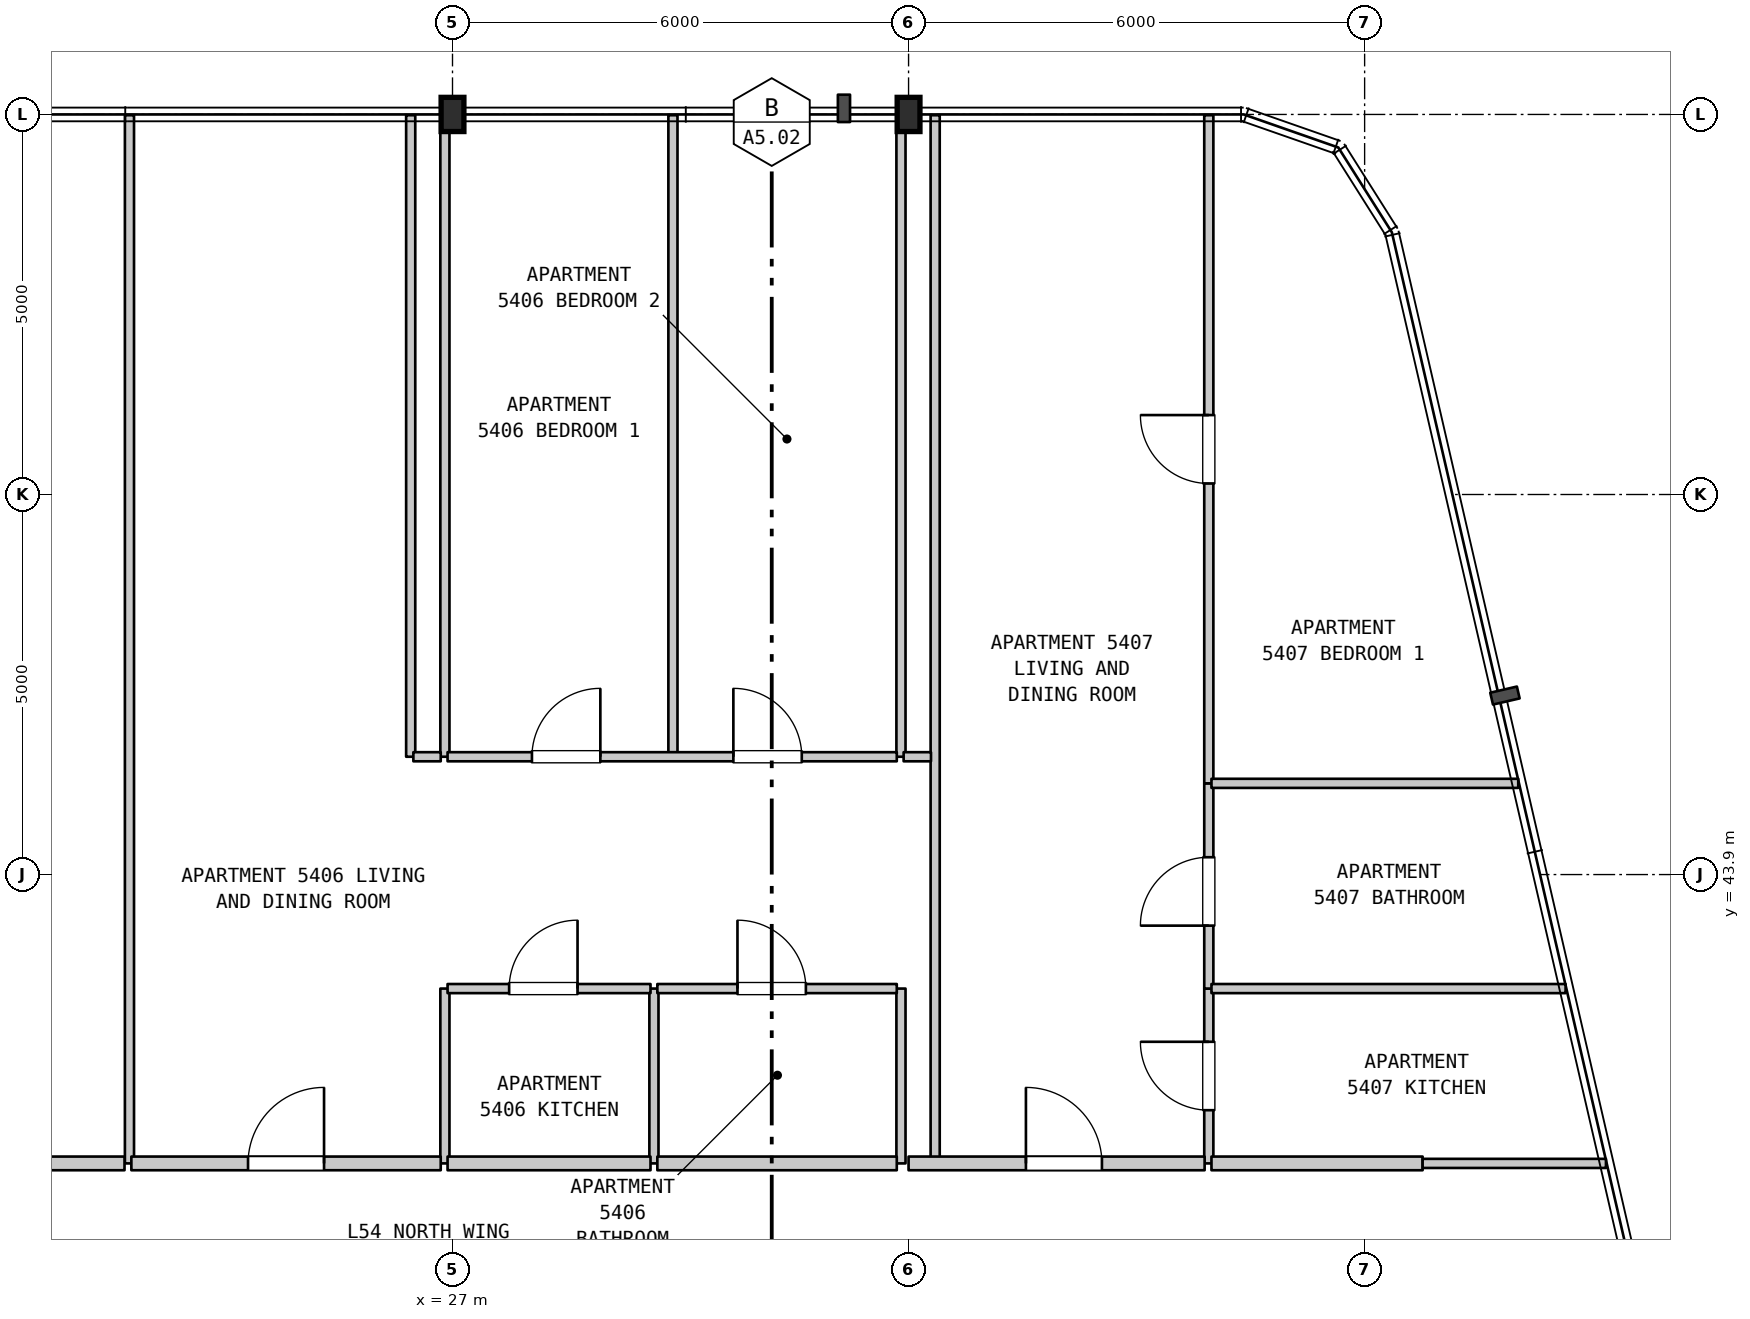
"""IFC4 building model, lengths in metres.
Left out: names, types, materials, properties, quantities, classifications, styles, units other than length and angle.
Written with IfcOpenShell. Run it as: python <this file> out.ifc"""

import sys

from ifc_helpers import new_model, si_unit, direction, frame, frame_2d, origin, origin_2d, place, context, subcontext, project, spatial, rectangle, i_section, extrude, element, fill, save


model = new_model("IFC4")
c1 = context("Model", 3, precision=1e-05, world=origin(), true_north=direction((0.0, 1.0)))
c2 = subcontext(c1, "Body", "Model", "MODEL_VIEW")
j1 = project(units=[si_unit("LENGTHUNIT", "METRE"), si_unit("PLANEANGLEUNIT", "RADIAN")], contexts=[c1])
p1 = place(None, origin())
s1 = spatial("IfcSite", under=j1, at=p1, CompositionType="ELEMENT")
p2 = place(p1, origin())
s2 = spatial("IfcBuilding", under=s1, at=p2, CompositionType="ELEMENT")
p3 = place(p2, frame((0.0, 0.0, 218.0)))
s3 = spatial("IfcBuildingStorey", under=s2, at=p3, CompositionType="ELEMENT", Elevation=218.0)
for number, where, z_axis, x_axis in (
    (1, (27.0, 53.9, 0.0), (0.0, 0.0, 1.0), (1.0, 0.0, 0.0)),
    (2, (33.0, 53.9, 0.0), (0.0, 0.0, 1.0), (1.0, 0.0, 0.0)),
):
    element("IfcColumn", number, at=place(p3, frame(where, z_axis=z_axis, x_axis=x_axis)), inside=s3, PredefinedType="COLUMN", context=c2, shape_type="SweptSolid", body=[
        extrude(i_section(OverallWidth=0.3, OverallDepth=0.45, WebThickness=0.014, FlangeThickness=0.026, FilletRadius=0.027, at=origin_2d()), origin(), (0.0, 0.0, 1.0), 4.8),
    ])
p4 = place(p3, frame((22.75, 40.1, 0.0), z_axis=(0.0, 0.0, 1.0), x_axis=(0.0, 1.0, 0.0)))
e3 = element("IfcWall", 3, at=p4, inside=s3, PredefinedType="PARTITIONING", context=c2, shape_type="SweptSolid", body=[
    extrude(rectangle(XDim=13.79, YDim=0.12, at=frame_2d((6.895, 0.0))), origin(), (0.0, 0.0, 1.0), 4.49),
])
p5 = place(p3, frame((26.45, 45.45, 0.0), z_axis=(0.0, 0.0, 1.0), x_axis=(0.0, 1.0, 0.0)))
e4 = element("IfcWall", 4, at=p5, inside=s3, PredefinedType="PARTITIONING", context=c2, shape_type="SweptSolid", body=[
    extrude(rectangle(XDim=8.44, YDim=0.12, at=frame_2d((4.22, 0.0))), origin(), (0.0, 0.0, 1.0), 4.49),
])
p6 = place(p3, frame((26.9, 40.1, 0.0), z_axis=(0.0, 0.0, 1.0), x_axis=(0.0, 1.0, 0.0)))
e5 = element("IfcWall", 5, at=p6, inside=s3, PredefinedType="PARTITIONING", context=c2, shape_type="SweptSolid", body=[
    extrude(rectangle(XDim=2.3, YDim=0.12, at=frame_2d((1.15, 0.0))), origin(), (0.0, 0.0, 1.0), 4.49),
])
p7 = place(p3, frame((26.9, 45.45, 0.0), z_axis=(0.0, 0.0, 1.0), x_axis=(0.0, 1.0, 0.0)))
e6 = element("IfcWall", 6, at=p7, inside=s3, PredefinedType="PARTITIONING", context=c2, shape_type="SweptSolid", body=[
    extrude(rectangle(XDim=8.44, YDim=0.12, at=frame_2d((4.22, 0.0))), origin(), (0.0, 0.0, 1.0), 4.49),
])
p8 = place(p3, frame((29.65, 40.1, 0.0), z_axis=(0.0, 0.0, 1.0), x_axis=(0.0, 1.0, 0.0)))
e7 = element("IfcWall", 7, at=p8, inside=s3, PredefinedType="PARTITIONING", context=c2, shape_type="SweptSolid", body=[
    extrude(rectangle(XDim=2.3, YDim=0.12, at=frame_2d((1.15, 0.0))), origin(), (0.0, 0.0, 1.0), 4.49),
])
p9 = place(p3, frame((29.9, 45.45, 0.0), z_axis=(0.0, 0.0, 1.0), x_axis=(0.0, 1.0, 0.0)))
e8 = element("IfcWall", 8, at=p9, inside=s3, PredefinedType="PARTITIONING", context=c2, shape_type="SweptSolid", body=[
    extrude(rectangle(XDim=8.44, YDim=0.12, at=frame_2d((4.22, 0.0))), origin(), (0.0, 0.0, 1.0), 4.49),
])
p10 = place(p3, frame((32.9, 40.1, 0.0), z_axis=(0.0, 0.0, 1.0), x_axis=(0.0, 1.0, 0.0)))
e9 = element("IfcWall", 9, at=p10, inside=s3, PredefinedType="PARTITIONING", context=c2, shape_type="SweptSolid", body=[
    extrude(rectangle(XDim=2.3, YDim=0.12, at=frame_2d((1.15, 0.0))), origin(), (0.0, 0.0, 1.0), 3.89),
])
p11 = place(p3, frame((32.9, 45.45, 0.0), z_axis=(0.0, 0.0, 1.0), x_axis=(0.0, 1.0, 0.0)))
e10 = element("IfcWall", 10, at=p11, inside=s3, PredefinedType="PARTITIONING", context=c2, shape_type="SweptSolid", body=[
    extrude(rectangle(XDim=8.44, YDim=0.12, at=frame_2d((4.22, 0.0))), origin(), (0.0, 0.0, 1.0), 3.89),
])
p12 = place(p3, frame((33.35, 40.1, 0.0), z_axis=(0.0, 0.0, 1.0), x_axis=(0.0, 1.0, 0.0)))
e11 = element("IfcWall", 11, at=p12, inside=s3, PredefinedType="PARTITIONING", context=c2, shape_type="SweptSolid", body=[
    extrude(rectangle(XDim=13.79, YDim=0.12, at=frame_2d((6.895, 0.0))), origin(), (0.0, 0.0, 1.0), 4.49),
])
p13 = place(p3, frame((36.95, 40.1, 0.0), z_axis=(0.0, 0.0, 1.0), x_axis=(0.0, 1.0, 0.0)))
e12 = element("IfcWall", 12, at=p13, inside=s3, PredefinedType="PARTITIONING", context=c2, shape_type="SweptSolid", body=[
    extrude(rectangle(XDim=2.3, YDim=0.12, at=frame_2d((1.15, 0.0))), origin(), (0.0, 0.0, 1.0), 4.49),
])
p14 = place(p13, frame((0.7, 0.0, 0.0)))
e13 = element("IfcOpeningElement", 13, at=p14, cuts=e12, PredefinedType="OPENING", context=c2, shape_type="SweptSolid", body=[
    extrude(rectangle(XDim=0.9, YDim=2.15, at=frame_2d((0.45, 1.075))), frame((0.0, 0.07, 0.0), z_axis=(0.0, -1.0, 0.0), x_axis=(1.0, 0.0, 0.0)), (0.0, 0.0, 1.0), 0.14),
])
p15 = place(p3, frame((36.95, 42.4, 0.0), z_axis=(0.0, 0.0, 1.0), x_axis=(0.0, 1.0, 0.0)))
e14 = element("IfcWall", 14, at=p15, inside=s3, PredefinedType="PARTITIONING", context=c2, shape_type="SweptSolid", body=[
    extrude(rectangle(XDim=2.7, YDim=0.12, at=frame_2d((1.35, 0.0))), origin(), (0.0, 0.0, 1.0), 4.49),
])
p16 = place(p15, frame((0.828, 0.0, 0.0)))
e15 = element("IfcOpeningElement", 15, at=p16, cuts=e14, PredefinedType="OPENING", context=c2, shape_type="SweptSolid", body=[
    extrude(rectangle(XDim=0.9, YDim=2.1, at=frame_2d((0.45, 1.05))), frame((0.0, 0.07, 0.0), z_axis=(0.0, -1.0, 0.0), x_axis=(1.0, 0.0, 0.0)), (0.0, 0.0, 1.0), 0.14),
])
p17 = place(p3, frame((36.95, 45.1, 0.0), z_axis=(0.0, 0.0, 1.0), x_axis=(0.0, 1.0, 0.0)))
e16 = element("IfcWall", 16, at=p17, inside=s3, PredefinedType="PARTITIONING", context=c2, shape_type="SweptSolid", body=[
    extrude(rectangle(XDim=8.79, YDim=0.12, at=frame_2d((4.395, 0.0))), origin(), (0.0, 0.0, 1.0), 4.49),
])
p18 = place(p17, frame((3.945, 0.0, 0.0)))
e17 = element("IfcOpeningElement", 17, at=p18, cuts=e16, PredefinedType="OPENING", context=c2, shape_type="SweptSolid", body=[
    extrude(rectangle(XDim=0.9, YDim=2.15, at=frame_2d((0.45, 1.075))), frame((0.0, 0.07, 0.0), z_axis=(0.0, -1.0, 0.0), x_axis=(1.0, 0.0, 0.0)), (0.0, 0.0, 1.0), 0.14),
])
p19 = place(p3, frame((20.275, 40.1, 0.0), z_axis=(0.0, 0.0, 1.0), x_axis=(1.0, 0.0, 0.0)))
e18 = element("IfcWall", 18, at=p19, inside=s3, PredefinedType="STANDARD", context=c2, shape_type="SweptSolid", body=[
    extrude(rectangle(XDim=2.41, YDim=0.18, at=frame_2d((1.205, 0.0))), origin(), (0.0, 0.0, 1.0), 4.49),
])
p20 = place(p3, frame((22.775, 40.1, 0.0), z_axis=(0.0, 0.0, 1.0), x_axis=(1.0, 0.0, 0.0)))
e19 = element("IfcWall", 19, at=p20, inside=s3, PredefinedType="STANDARD", context=c2, shape_type="SweptSolid", body=[
    extrude(rectangle(XDim=4.07, YDim=0.18, at=frame_2d((2.035, 0.0))), origin(), (0.0, 0.0, 1.0), 4.49),
])
p21 = place(p20, frame((1.535, 0.0, 0.0)))
e20 = element("IfcOpeningElement", 20, at=p21, cuts=e19, PredefinedType="OPENING", context=c2, shape_type="SweptSolid", body=[
    extrude(rectangle(XDim=1.0, YDim=2.15, at=frame_2d((0.5, 1.075))), frame((0.0, 0.1, 0.0), z_axis=(0.0, -1.0, 0.0), x_axis=(1.0, 0.0, 0.0)), (0.0, 0.0, 1.0), 0.2),
])
p22 = place(p3, frame((26.935, 40.1, 0.0), z_axis=(0.0, 0.0, 1.0), x_axis=(1.0, 0.0, 0.0)))
e21 = element("IfcWall", 21, at=p22, inside=s3, PredefinedType="STANDARD", context=c2, shape_type="SweptSolid", body=[
    extrude(rectangle(XDim=2.67, YDim=0.18, at=frame_2d((1.335, 0.0))), origin(), (0.0, 0.0, 1.0), 4.49),
])
p23 = place(p3, frame((29.695, 40.1, 0.0), z_axis=(0.0, 0.0, 1.0), x_axis=(1.0, 0.0, 0.0)))
e22 = element("IfcWall", 22, at=p23, inside=s3, PredefinedType="STANDARD", context=c2, shape_type="SweptSolid", body=[
    extrude(rectangle(XDim=3.15, YDim=0.18, at=frame_2d((1.575, 0.0))), origin(), (0.0, 0.0, 1.0), 4.49),
])
p24 = place(p3, frame((33.0, 40.1, 0.0), z_axis=(0.0, 0.0, 1.0), x_axis=(1.0, 0.0, 0.0)))
e23 = element("IfcWall", 23, at=p24, inside=s3, PredefinedType="STANDARD", context=c2, shape_type="SweptSolid", body=[
    extrude(rectangle(XDim=3.895, YDim=0.18, at=frame_2d((1.948, 0.0))), origin(), (0.0, 0.0, 1.0), 4.49),
])
p25 = place(p24, frame((1.544, 0.0, 0.0)))
e24 = element("IfcOpeningElement", 24, at=p25, cuts=e23, PredefinedType="OPENING", context=c2, shape_type="SweptSolid", body=[
    extrude(rectangle(XDim=1.0, YDim=2.15, at=frame_2d((0.5, 1.075))), frame((0.0, 0.1, 0.0), z_axis=(0.0, -1.0, 0.0), x_axis=(1.0, 0.0, 0.0)), (0.0, 0.0, 1.0), 0.2),
])
p26 = place(p3, frame((36.985, 40.1, 0.0), z_axis=(0.0, 0.0, 1.0), x_axis=(1.0, 0.0, 0.0)))
e25 = element("IfcWall", 25, at=p26, inside=s3, PredefinedType="STANDARD", context=c2, shape_type="SweptSolid", body=[
    extrude(rectangle(XDim=2.778, YDim=0.18, at=frame_2d((1.389, 0.0))), origin(), (0.0, 0.0, 1.0), 4.49),
])
p27 = place(p3, frame((39.763, 40.1, 0.0), z_axis=(0.0, 0.0, 1.0), x_axis=(1.0, 0.0, 0.0)))
e26 = element("IfcWall", 26, at=p27, inside=s3, PredefinedType="PARTITIONING", context=c2, shape_type="SweptSolid", body=[
    extrude(rectangle(XDim=2.412, YDim=0.12, at=frame_2d((1.206, 0.0))), origin(), (0.0, 0.0, 1.0), 4.49),
])
p28 = place(p3, frame((26.935, 42.4, 0.0), z_axis=(0.0, 0.0, 1.0), x_axis=(1.0, 0.0, 0.0)))
e27 = element("IfcWall", 27, at=p28, inside=s3, PredefinedType="PARTITIONING", context=c2, shape_type="SweptSolid", body=[
    extrude(rectangle(XDim=2.67, YDim=0.12, at=frame_2d((1.335, 0.0))), origin(), (0.0, 0.0, 1.0), 4.49),
])
p29 = place(p28, frame((0.81, 0.0, 0.0)))
e28 = element("IfcOpeningElement", 28, at=p29, cuts=e27, PredefinedType="OPENING", context=c2, shape_type="SweptSolid", body=[
    extrude(rectangle(XDim=0.9, YDim=2.15, at=frame_2d((0.45, 1.075))), frame((0.0, 0.07, 0.0), z_axis=(0.0, -1.0, 0.0), x_axis=(1.0, 0.0, 0.0)), (0.0, 0.0, 1.0), 0.14),
])
p30 = place(p3, frame((29.695, 42.4, 0.0), z_axis=(0.0, 0.0, 1.0), x_axis=(1.0, 0.0, 0.0)))
e29 = element("IfcWall", 29, at=p30, inside=s3, PredefinedType="PARTITIONING", context=c2, shape_type="SweptSolid", body=[
    extrude(rectangle(XDim=3.15, YDim=0.12, at=frame_2d((1.575, 0.0))), origin(), (0.0, 0.0, 1.0), 4.49),
])
p31 = place(p30, frame((1.054, 0.0, 0.0)))
e30 = element("IfcOpeningElement", 30, at=p31, cuts=e29, PredefinedType="OPENING", context=c2, shape_type="SweptSolid", body=[
    extrude(rectangle(XDim=0.9, YDim=2.1, at=frame_2d((0.45, 1.05))), frame((0.0, 0.07, 0.0), z_axis=(0.0, -1.0, 0.0), x_axis=(1.0, 0.0, 0.0)), (0.0, 0.0, 1.0), 0.14),
])
p32 = place(p3, frame((36.985, 42.4, 0.0), z_axis=(0.0, 0.0, 1.0), x_axis=(1.0, 0.0, 0.0)))
e31 = element("IfcWall", 31, at=p32, inside=s3, PredefinedType="PARTITIONING", context=c2, shape_type="SweptSolid", body=[
    extrude(rectangle(XDim=4.659, YDim=0.12, at=frame_2d((2.33, 0.0))), origin(), (0.0, 0.0, 1.0), 4.49),
])
p33 = place(p3, frame((36.985, 45.1, 0.0), z_axis=(0.0, 0.0, 1.0), x_axis=(1.0, 0.0, 0.0)))
e32 = element("IfcWall", 32, at=p33, inside=s3, PredefinedType="PARTITIONING", context=c2, shape_type="SweptSolid", body=[
    extrude(rectangle(XDim=4.036, YDim=0.12, at=frame_2d((2.018, 0.0))), origin(), (0.0, 0.0, 1.0), 4.49),
])
p34 = place(p3, frame((26.485, 45.45, 0.0), z_axis=(0.0, 0.0, 1.0), x_axis=(1.0, 0.0, 0.0)))
e33 = element("IfcWall", 33, at=p34, inside=s3, PredefinedType="PARTITIONING", context=c2, shape_type="SweptSolid", body=[
    extrude(rectangle(XDim=0.36, YDim=0.12, at=frame_2d((0.18, 0.0))), origin(), (0.0, 0.0, 1.0), 4.49),
])
p35 = place(p3, frame((26.935, 45.45, 0.0), z_axis=(0.0, 0.0, 1.0), x_axis=(1.0, 0.0, 0.0)))
e34 = element("IfcWall", 34, at=p35, inside=s3, PredefinedType="PARTITIONING", context=c2, shape_type="SweptSolid", body=[
    extrude(rectangle(XDim=5.91, YDim=0.12, at=frame_2d((2.955, 0.0))), origin(), (0.0, 0.0, 1.0), 4.49),
])
p36 = place(p35, frame((1.11, 0.0, 0.0)))
e35 = element("IfcOpeningElement", 35, at=p36, cuts=e34, PredefinedType="OPENING", context=c2, shape_type="SweptSolid", body=[
    extrude(rectangle(XDim=0.9, YDim=2.15, at=frame_2d((0.45, 1.075))), frame((0.0, 0.07, 0.0), z_axis=(0.0, -1.0, 0.0), x_axis=(1.0, 0.0, 0.0)), (0.0, 0.0, 1.0), 0.14),
])
p37 = place(p35, frame((3.76, 0.0, 0.0)))
e36 = element("IfcOpeningElement", 36, at=p37, cuts=e34, PredefinedType="OPENING", context=c2, shape_type="SweptSolid", body=[
    extrude(rectangle(XDim=0.9, YDim=2.15, at=frame_2d((0.45, 1.075))), frame((0.0, 0.07, 0.0), z_axis=(0.0, -1.0, 0.0), x_axis=(1.0, 0.0, 0.0)), (0.0, 0.0, 1.0), 0.14),
])
p38 = place(p3, frame((32.935, 45.45, 0.0), z_axis=(0.0, 0.0, 1.0), x_axis=(1.0, 0.0, 0.0)))
e37 = element("IfcWall", 37, at=p38, inside=s3, PredefinedType="PARTITIONING", context=c2, shape_type="SweptSolid", body=[
    extrude(rectangle(XDim=0.36, YDim=0.12, at=frame_2d((0.18, 0.0))), origin(), (0.0, 0.0, 1.0), 4.49),
])
p39 = place(p14, origin())
e38 = element("IfcDoor", 38, at=p39, inside=s3, OperationType="SINGLE_SWING_RIGHT", PredefinedType="DOOR", context=c2, shape_type="SweptSolid", body=[
    extrude(rectangle(XDim=0.9, YDim=2.15, at=frame_2d((0.45, 1.075))), frame((0.0, 0.025, 0.0), z_axis=(0.0, -1.0, 0.0), x_axis=(1.0, 0.0, 0.0)), (0.0, 0.0, 1.0), 0.05),
])
fill(e13, e38)
p40 = place(p16, origin())
e39 = element("IfcDoor", 39, at=p40, inside=s3, OperationType="SINGLE_SWING_LEFT", PredefinedType="DOOR", context=c2, shape_type="SweptSolid", body=[
    extrude(rectangle(XDim=0.9, YDim=2.1, at=frame_2d((0.45, 1.05))), frame((0.0, 0.025, 0.0), z_axis=(0.0, -1.0, 0.0), x_axis=(1.0, 0.0, 0.0)), (0.0, 0.0, 1.0), 0.05),
])
fill(e15, e39)
p41 = place(p18, origin())
e40 = element("IfcDoor", 40, at=p41, inside=s3, OperationType="SINGLE_SWING_RIGHT", PredefinedType="DOOR", context=c2, shape_type="SweptSolid", body=[
    extrude(rectangle(XDim=0.9, YDim=2.15, at=frame_2d((0.45, 1.075))), frame((0.0, 0.025, 0.0), z_axis=(0.0, -1.0, 0.0), x_axis=(1.0, 0.0, 0.0)), (0.0, 0.0, 1.0), 0.05),
])
fill(e17, e40)
p42 = place(p21, origin())
e41 = element("IfcDoor", 41, at=p42, inside=s3, OperationType="SINGLE_SWING_RIGHT", PredefinedType="DOOR", context=c2, shape_type="SweptSolid", body=[
    extrude(rectangle(XDim=1.0, YDim=2.15, at=frame_2d((0.5, 1.075))), frame((0.0, 0.025, 0.0), z_axis=(0.0, -1.0, 0.0), x_axis=(1.0, 0.0, 0.0)), (0.0, 0.0, 1.0), 0.05),
])
fill(e20, e41)
p43 = place(p25, origin())
e42 = element("IfcDoor", 42, at=p43, inside=s3, OperationType="SINGLE_SWING_LEFT", PredefinedType="DOOR", context=c2, shape_type="SweptSolid", body=[
    extrude(rectangle(XDim=1.0, YDim=2.15, at=frame_2d((0.5, 1.075))), frame((0.0, 0.025, 0.0), z_axis=(0.0, -1.0, 0.0), x_axis=(1.0, 0.0, 0.0)), (0.0, 0.0, 1.0), 0.05),
])
fill(e24, e42)
p44 = place(p29, origin())
e43 = element("IfcDoor", 43, at=p44, inside=s3, OperationType="SINGLE_SWING_RIGHT", PredefinedType="DOOR", context=c2, shape_type="SweptSolid", body=[
    extrude(rectangle(XDim=0.9, YDim=2.15, at=frame_2d((0.45, 1.075))), frame((0.0, 0.025, 0.0), z_axis=(0.0, -1.0, 0.0), x_axis=(1.0, 0.0, 0.0)), (0.0, 0.0, 1.0), 0.05),
])
fill(e28, e43)
p45 = place(p31, origin())
e44 = element("IfcDoor", 44, at=p45, inside=s3, OperationType="SINGLE_SWING_LEFT", PredefinedType="DOOR", context=c2, shape_type="SweptSolid", body=[
    extrude(rectangle(XDim=0.9, YDim=2.1, at=frame_2d((0.45, 1.05))), frame((0.0, 0.025, 0.0), z_axis=(0.0, -1.0, 0.0), x_axis=(1.0, 0.0, 0.0)), (0.0, 0.0, 1.0), 0.05),
])
fill(e30, e44)
p46 = place(p36, origin())
e45 = element("IfcDoor", 45, at=p46, inside=s3, OperationType="SINGLE_SWING_RIGHT", PredefinedType="DOOR", context=c2, shape_type="SweptSolid", body=[
    extrude(rectangle(XDim=0.9, YDim=2.15, at=frame_2d((0.45, 1.075))), frame((0.0, 0.025, 0.0), z_axis=(0.0, -1.0, 0.0), x_axis=(1.0, 0.0, 0.0)), (0.0, 0.0, 1.0), 0.05),
])
fill(e35, e45)
p47 = place(p37, origin())
e46 = element("IfcDoor", 46, at=p47, inside=s3, OperationType="SINGLE_SWING_LEFT", PredefinedType="DOOR", context=c2, shape_type="SweptSolid", body=[
    extrude(rectangle(XDim=0.9, YDim=2.15, at=frame_2d((0.45, 1.075))), frame((0.0, 0.025, 0.0), z_axis=(0.0, -1.0, 0.0), x_axis=(1.0, 0.0, 0.0)), (0.0, 0.0, 1.0), 0.05),
])
fill(e36, e46)
save(model, sys.argv[1])
